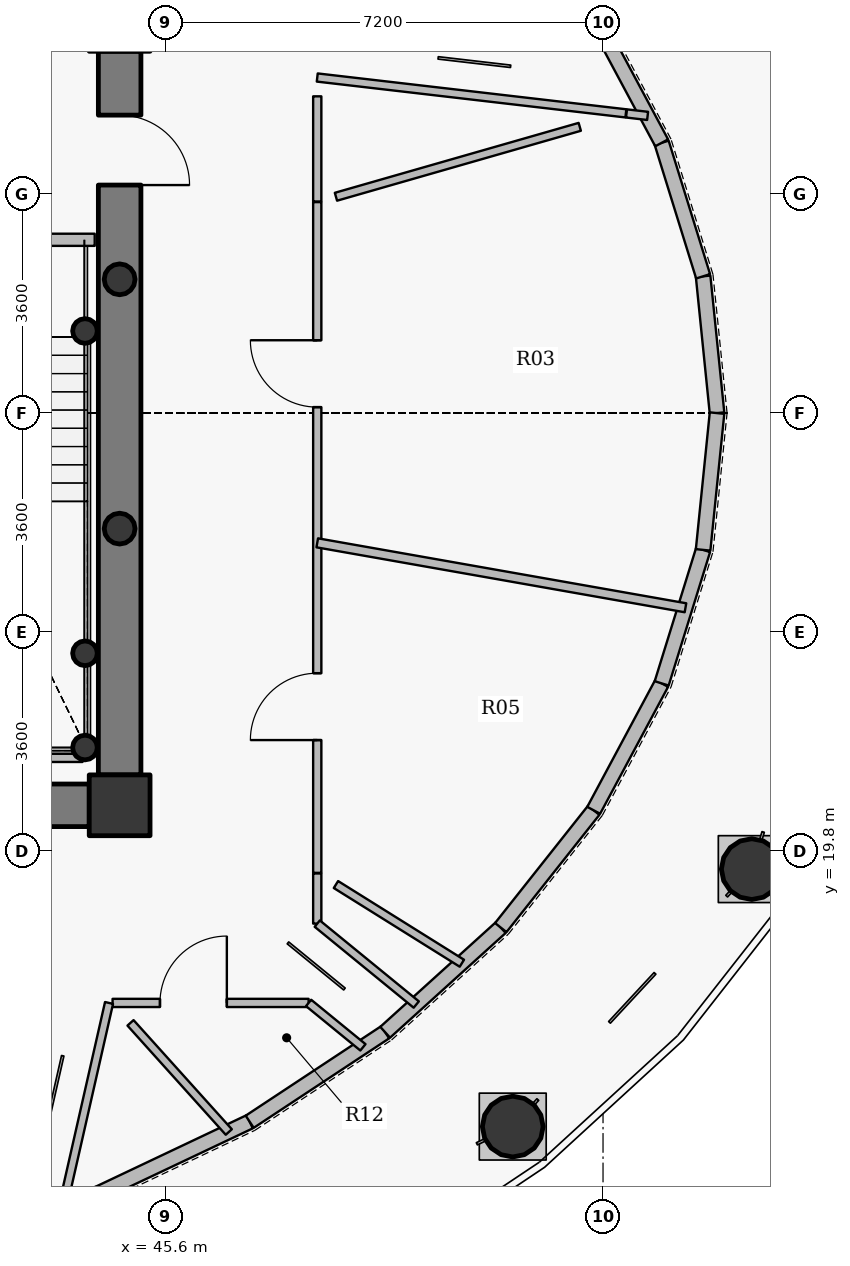
"""IFC4 building model, lengths in metres.
Left out: names, types, materials, properties, quantities, classifications, styles, units other than length and angle.
Written with IfcOpenShell. Run it as: python <this file> out.ifc"""

import sys

from ifc_helpers import new_model, si_unit, direction, frame, frame_2d, origin, origin_2d, place, context, subcontext, project, spatial, rectangle, hollow_circle, extrude, source, transform, mapped, element, fill, save


model = new_model("IFC4")
c1 = context("Model", 3, precision=1e-05, world=origin(), true_north=direction((0.0, 1.0)))
c2 = subcontext(c1, "Body", "Model", "MODEL_VIEW")
j1 = project(units=[si_unit("LENGTHUNIT", "METRE"), si_unit("PLANEANGLEUNIT", "RADIAN")], contexts=[c1])
p1 = place(None, origin())
s1 = spatial("IfcSite", under=j1, at=p1, CompositionType="ELEMENT")
p2 = place(p1, origin())
s2 = spatial("IfcBuilding", under=s1, at=p2, CompositionType="ELEMENT")
p3 = place(p2, frame((0.0, 0.0, 318.0)))
s3 = spatial("IfcBuildingStorey", under=s2, at=p3, CompositionType="ELEMENT", Elevation=318.0)
p4 = place(p3, frame((44.85, 20.55, 0.0), z_axis=(0.0, 0.0, 1.0), x_axis=(1.0, 0.0, 0.0)))
e1 = element("IfcColumn", 1, at=p4, inside=s3, PredefinedType="COLUMN", context=c2, shape_type="SweptSolid", body=[
    extrude(rectangle(XDim=1.0, YDim=1.0, at=origin_2d()), origin(), (0.0, 0.0, 1.0), 6.0),
])
for number, where, z_axis, x_axis in (
    (2, (44.28, 21.5, 0.0), (0.0, 0.0, 1.0), (1.0, 0.0, 0.0)),
    (3, (44.28, 23.05, 0.0), (0.0, 0.0, 1.0), (1.0, 0.0, 0.0)),
    (4, (44.28, 28.35, 0.0), (0.0, 0.0, 1.0), (1.0, 0.0, 0.0)),
):
    element("IfcColumn", number, at=place(p3, frame(where, z_axis=z_axis, x_axis=x_axis)), inside=s3, PredefinedType="COLUMN", context=c2, shape_type="SweptSolid", body=[
        extrude(hollow_circle(Radius=0.203, WallThickness=0.016, at=origin_2d()), origin(), (0.0, 0.0, 1.0), 6.0),
    ])
p5 = place(p3, frame((44.85, 32.95, 0.0), z_axis=(0.0, 0.0, 1.0), x_axis=(0.0, -1.0, 0.0)))
e5 = element("IfcWall", 5, at=p5, inside=s3, PredefinedType="SHEAR", context=c2, shape_type="SweptSolid", body=[
    extrude(rectangle(XDim=11.9, YDim=0.7, at=frame_2d((5.95, 0.0))), origin(), (0.0, 0.0, 1.0), 5.3),
])
p6 = place(p5, frame((1.05, 0.0, 0.0)))
e6 = element("IfcOpeningElement", 6, at=p6, cuts=e5, PredefinedType="OPENING", context=c2, shape_type="SweptSolid", body=[
    extrude(rectangle(XDim=1.15, YDim=2.15, at=origin_2d()), frame((0.575, 0.36, 1.075), z_axis=(0.0, -1.0, 0.0), x_axis=(1.0, 0.0, 0.0)), (0.0, 0.0, 1.0), 0.72),
])
p7 = place(p3, frame((44.35, 20.55, 0.0), z_axis=(0.0, 0.0, 1.0), x_axis=(-1.0, 0.0, 0.0)))
e7 = element("IfcWall", 7, at=p7, inside=s3, PredefinedType="SHEAR", context=c2, shape_type="SweptSolid", body=[
    extrude(rectangle(XDim=16.7, YDim=0.7, at=frame_2d((8.35, 0.0))), origin(), (0.0, 0.0, 1.0), 5.3),
])
p8 = place(p7, frame((12.3, 0.0, 0.0)))
e8 = element("IfcOpeningElement", 8, at=p8, cuts=e7, PredefinedType="OPENING", context=c2, shape_type="SweptSolid", body=[
    extrude(rectangle(XDim=1.15, YDim=2.15, at=origin_2d()), frame((0.575, 0.36, 1.075), z_axis=(0.0, -1.0, 0.0), x_axis=(1.0, 0.0, 0.0)), (0.0, 0.0, 1.0), 0.72),
])
for number, where, z_axis, x_axis in (
    (9, (51.315, 15.267, 0.0), (0.0, 0.0, 1.0), (1.0, 0.0, 0.0)),
    (10, (55.246, 19.5, 0.0), (0.0, 0.0, 1.0), (1.0, 0.0, 0.0)),
):
    element("IfcColumn", number, at=place(p3, frame(where, z_axis=z_axis, x_axis=x_axis)), inside=s3, PredefinedType="COLUMN", context=c2, shape_type="SweptSolid", body=[
        extrude(hollow_circle(Radius=0.5, WallThickness=0.032, at=origin_2d()), origin(), (0.0, 0.0, 1.0), 5.75),
    ])
for number, where, z_axis, x_axis in (
    (11, (44.85, 25.1, 0.0), (0.0, 0.0, 1.0), (1.0, 0.0, 0.0)),
    (12, (44.85, 29.2, 0.0), (0.0, 0.0, 1.0), (1.0, 0.0, 0.0)),
):
    element("IfcColumn", number, at=place(p3, frame(where, z_axis=z_axis, x_axis=x_axis)), inside=s3, PredefinedType="COLUMN", context=c2, shape_type="SweptSolid", body=[
        extrude(hollow_circle(Radius=0.254, WallThickness=0.02, at=origin_2d()), origin(), (0.0, 0.0, 1.0), 6.0),
    ])
p9 = place(p3, frame((54.446, 29.25, 0.0), z_axis=(0.0, 0.0, 1.0), x_axis=(0.101278157468, -0.994858148089, 0.0)))
e13 = element("IfcWall", 13, at=p9, inside=s3, PredefinedType="SOLIDWALL", context=c2, shape_type="SweptSolid", body=[
    extrude(rectangle(XDim=2.261, YDim=0.24, at=frame_2d((1.131, 0.0))), origin(), (0.0, 0.0, 1.0), 4.235),
])
p10 = place(p3, frame((53.765, 31.445, 0.0), z_axis=(0.0, 0.0, 1.0), x_axis=(0.296466035026, -0.95504339696, 0.0)))
e14 = element("IfcWall", 14, at=p10, inside=s3, PredefinedType="SOLIDWALL", context=c2, shape_type="SweptSolid", body=[
    extrude(rectangle(XDim=2.298, YDim=0.24, at=frame_2d((1.149, 0.0))), origin(), (0.0, 0.0, 1.0), 4.235),
])
p11 = place(p3, frame((52.646, 33.532, 0.0), z_axis=(0.0, 0.0, 1.0), x_axis=(0.472149891985, -0.881518280865, 0.0)))
e15 = element("IfcWall", 15, at=p11, inside=s3, PredefinedType="SOLIDWALL", context=c2, shape_type="SweptSolid", body=[
    extrude(rectangle(XDim=2.368, YDim=0.24, at=frame_2d((1.184, 0.0))), origin(), (0.0, 0.0, 1.0), 2.832),
])
p12 = place(p3, frame((46.989, 15.346, 0.0), z_axis=(0.0, 0.0, 1.0), x_axis=(-0.903637179904, -0.428298782505, 0.0)))
e16 = element("IfcWall", 16, at=p12, inside=s3, PredefinedType="SOLIDWALL", context=c2, shape_type="SweptSolid", body=[
    extrude(rectangle(XDim=2.766, YDim=0.24, at=frame_2d((1.383, 0.0))), origin(), (0.0, 0.0, 1.0), 5.75),
])
p13 = place(p3, frame((49.217, 16.818, 0.0), z_axis=(0.0, 0.0, 1.0), x_axis=(-0.834405901953, -0.551150424827, 0.0)))
e17 = element("IfcWall", 17, at=p13, inside=s3, PredefinedType="SOLIDWALL", context=c2, shape_type="SweptSolid", body=[
    extrude(rectangle(XDim=2.67, YDim=0.24, at=frame_2d((1.335, 0.0))), origin(), (0.0, 0.0, 1.0), 2.832),
])
p14 = place(p3, frame((51.118, 18.539, 0.0), z_axis=(0.0, 0.0, 1.0), x_axis=(-0.741265131079, -0.671212340058, 0.0)))
e18 = element("IfcWall", 18, at=p14, inside=s3, PredefinedType="SOLIDWALL", context=c2, shape_type="SweptSolid", body=[
    extrude(rectangle(XDim=2.565, YDim=0.24, at=frame_2d((1.282, 0.0))), origin(), (0.0, 0.0, 1.0), 2.832),
])
p15 = place(p3, frame((52.646, 20.468, 0.0), z_axis=(0.0, 0.0, 1.0), x_axis=(-0.621045987707, -0.783774126361, 0.0)))
e19 = element("IfcWall", 19, at=p15, inside=s3, PredefinedType="SOLIDWALL", context=c2, shape_type="SweptSolid", body=[
    extrude(rectangle(XDim=2.46, YDim=0.24, at=frame_2d((1.23, 0.0))), origin(), (0.0, 0.0, 1.0), 4.235),
])
p16 = place(p3, frame((53.765, 22.555, 0.0), z_axis=(0.0, 0.0, 1.0), x_axis=(-0.472149891985, -0.881518280865, 0.0)))
e20 = element("IfcWall", 20, at=p16, inside=s3, PredefinedType="SOLIDWALL", context=c2, shape_type="SweptSolid", body=[
    extrude(rectangle(XDim=2.368, YDim=0.24, at=frame_2d((1.184, 0.0))), origin(), (0.0, 0.0, 1.0), 4.235),
])
p17 = place(p3, frame((54.446, 24.75, 0.0), z_axis=(0.0, 0.0, 1.0), x_axis=(-0.296466035026, -0.95504339696, 0.0)))
e21 = element("IfcWall", 21, at=p17, inside=s3, PredefinedType="SOLIDWALL", context=c2, shape_type="SweptSolid", body=[
    extrude(rectangle(XDim=2.298, YDim=0.24, at=frame_2d((1.149, 0.0))), origin(), (0.0, 0.0, 1.0), 5.75),
])
p18 = place(p3, frame((54.675, 27.0, 0.0), z_axis=(0.0, 0.0, 1.0), x_axis=(-0.101278157468, -0.994858148089, 0.0)))
e22 = element("IfcWall", 22, at=p18, inside=s3, PredefinedType="SOLIDWALL", context=c2, shape_type="SweptSolid", body=[
    extrude(rectangle(XDim=2.261, YDim=0.24, at=frame_2d((1.131, 0.0))), origin(), (0.0, 0.0, 1.0), 4.235),
])
p19 = place(p3, frame((35.95, 29.85, 0.0), z_axis=(0.0, 0.0, 1.0), x_axis=(1.0, 0.0, 0.0)))
e23 = element("IfcWall", 23, at=p19, inside=s3, PredefinedType="PARTITIONING", context=c2, shape_type="SweptSolid", body=[
    extrude(rectangle(XDim=8.49, YDim=0.2, at=frame_2d((4.245, 0.0))), origin(), (0.0, 0.0, 1.0), 5.335),
])
p20 = place(p19, frame((6.1, 0.0, 0.0)))
e24 = element("IfcOpeningElement", 24, at=p20, cuts=e23, PredefinedType="OPENING", context=c2, shape_type="SweptSolid", body=[
    extrude(rectangle(XDim=1.2, YDim=2.15, at=origin_2d()), frame((0.6, 0.11, 1.075), z_axis=(0.0, -1.0, 0.0), x_axis=(1.0, 0.0, 0.0)), (0.0, 0.0, 1.0), 0.22),
])
p21 = place(p19, frame((0.37, 0.0, 0.0)))
e25 = element("IfcOpeningElement", 25, at=p21, cuts=e23, PredefinedType="OPENING", context=c2, shape_type="SweptSolid", body=[
    extrude(rectangle(XDim=1.15, YDim=2.15, at=origin_2d()), frame((0.575, 0.11, 1.075), z_axis=(0.0, -1.0, 0.0), x_axis=(1.0, 0.0, 0.0)), (0.0, 0.0, 1.0), 0.22),
])
p22 = place(p19, frame((2.425, 0.0, 0.0)))
e26 = element("IfcOpeningElement", 26, at=p22, cuts=e23, PredefinedType="OPENING", context=c2, shape_type="SweptSolid", body=[
    extrude(rectangle(XDim=1.05, YDim=2.15, at=origin_2d()), frame((0.525, 0.11, 1.075), z_axis=(0.0, -1.0, 0.0), x_axis=(1.0, 0.0, 0.0)), (0.0, 0.0, 1.0), 0.22),
])
p23 = place(p3, frame((44.734, 17.3, 0.0), z_axis=(0.0, 0.0, 1.0), x_axis=(1.0, 0.0, 0.0)))
e27 = element("IfcWall", 27, at=p23, inside=s3, PredefinedType="PARTITIONING", context=c2, shape_type="SweptSolid", body=[
    extrude(rectangle(XDim=3.224, YDim=0.135, at=frame_2d((1.612, 0.0))), origin(), (0.0, 0.0, 1.0), 5.75),
])
p24 = place(p23, frame((0.779, 0.0, 0.0)))
e28 = element("IfcOpeningElement", 28, at=p24, cuts=e27, PredefinedType="OPENING", context=c2, shape_type="SweptSolid", body=[
    extrude(rectangle(XDim=1.1, YDim=2.15, at=origin_2d()), frame((0.55, 0.078, 1.075), z_axis=(0.0, -1.0, 0.0), x_axis=(1.0, 0.0, 0.0)), (0.0, 0.0, 1.0), 0.155),
])
p25 = place(p3, frame((47.958, 17.3, 0.0), z_axis=(0.0, 0.0, 1.0), x_axis=(0.774324787676, -0.632788371568, 0.0)))
e29 = element("IfcWall", 29, at=p25, inside=s3, PredefinedType="PARTITIONING", context=c2, shape_type="SweptSolid", body=[
    extrude(rectangle(XDim=1.154, YDim=0.135, at=frame_2d((0.577, 0.0))), origin(), (0.0, 0.0, 1.0), 5.75),
])
p26 = place(p3, frame((48.1, 19.439, 0.0), z_axis=(0.0, 0.0, 1.0), x_axis=(0.0, 1.0, 0.0)))
e30 = element("IfcWall", 30, at=p26, inside=s3, PredefinedType="PARTITIONING", context=c2, shape_type="SweptSolid", body=[
    extrude(rectangle(XDim=11.031, YDim=0.135, at=frame_2d((5.515, 0.0))), origin(), (0.0, 0.0, 1.0), 4.235),
])
p27 = place(p26, frame((2.184, 0.0, 0.0)))
e31 = element("IfcOpeningElement", 31, at=p27, cuts=e30, PredefinedType="OPENING", context=c2, shape_type="SweptSolid", body=[
    extrude(rectangle(XDim=1.1, YDim=2.15, at=origin_2d()), frame((0.55, 0.078, 1.075), z_axis=(0.0, -1.0, 0.0), x_axis=(1.0, 0.0, 0.0)), (0.0, 0.0, 1.0), 0.155),
])
p28 = place(p26, frame((7.659, 0.0, 0.0)))
e32 = element("IfcOpeningElement", 32, at=p28, cuts=e30, PredefinedType="OPENING", context=c2, shape_type="SweptSolid", body=[
    extrude(rectangle(XDim=1.1, YDim=2.15, at=origin_2d()), frame((0.55, 0.078, 1.075), z_axis=(0.0, -1.0, 0.0), x_axis=(1.0, 0.0, 0.0)), (0.0, 0.0, 1.0), 0.155),
])
p29 = place(p3, frame((48.1, 24.866, 0.0), z_axis=(0.0, 0.0, 1.0), x_axis=(0.984805134994, -0.173663024531, 0.0)))
e33 = element("IfcWall", 33, at=p29, inside=s3, PredefinedType="PARTITIONING", context=c2, shape_type="SweptSolid", body=[
    extrude(rectangle(XDim=6.149, YDim=0.15, at=frame_2d((3.075, 0.0))), origin(), (0.0, 0.0, 1.0), 5.75),
])
p30 = place(p3, frame((53.186, 31.928, 0.0), z_axis=(0.0, 0.0, 1.0), x_axis=(0.993273839517, -0.115788944775, 0.0)))
e34 = element("IfcWall", 34, at=p30, inside=s3, PredefinedType="PARTITIONING", context=c2, shape_type="SweptSolid", body=[
    extrude(rectangle(XDim=0.35, YDim=0.135, at=frame_2d((0.175, 0.0))), origin(), (0.0, 0.0, 1.0), 5.75),
])
p31 = place(p3, frame((44.24, 21.33, 0.0), z_axis=(0.0, 0.0, 1.0), x_axis=(-1.0, 0.0, 0.0)))
e35 = element("IfcWall", 35, at=p31, inside=s3, PredefinedType="PARTITIONING", context=c2, shape_type="SweptSolid", body=[
    extrude(rectangle(XDim=2.98, YDim=0.135, at=frame_2d((1.49, 0.0))), origin(), (0.0, 0.0, 1.0), 5.285),
])
p32 = place(p3, frame((44.676, 17.3, 0.0), z_axis=(0.0, 0.0, 1.0), x_axis=(-0.221565425892, -0.975145508142, 0.0)))
e36 = element("IfcWall", 36, at=p32, inside=s3, PredefinedType="PARTITIONING", context=c2, shape_type="SweptSolid", body=[
    extrude(rectangle(XDim=3.411, YDim=0.135, at=frame_2d((1.706, 0.0))), origin(), (0.0, 0.0, 1.0), 5.75),
])
p33 = place(p3, frame((44.36, 20.2, 0.0), z_axis=(0.0, 0.0, 1.0), x_axis=(1.0, 0.0, 0.0)))
e37 = element("IfcWall", 37, at=p33, inside=s3, PredefinedType="PARTITIONING", context=c2, shape_type="SweptSolid", body=[
    extrude(rectangle(XDim=0.84, YDim=0.135, at=frame_2d((0.42, 0.0))), origin(), (0.0, 0.0, 1.0), 2.832),
])
p34 = place(p3, frame((45.2, 20.508, 0.0), z_axis=(0.0, 0.0, 1.0), x_axis=(0.0, 1.0, 0.0)))
e38 = element("IfcWall", 38, at=p34, inside=s3, PredefinedType="PARTITIONING", context=c2, shape_type="SweptSolid", body=[
    extrude(rectangle(XDim=0.532, YDim=0.135, at=frame_2d((0.266, 0.0))), origin(), (0.0, 0.0, 1.0), 5.75),
])
p35 = place(p3, frame((53.176, 31.929, 0.0), z_axis=(0.0, 0.0, 1.0), x_axis=(-0.993315281572, 0.115432886978, 0.0)))
e39 = element("IfcWall", 39, at=p35, inside=s3, PredefinedType="PARTITIONING", context=c2, shape_type="SweptSolid", body=[
    extrude(rectangle(XDim=5.11, YDim=0.135, at=frame_2d((2.555, 0.0))), origin(), (0.0, 0.0, 1.0), 5.75),
])
p36 = place(p3, frame((48.1, 32.209, 0.0), z_axis=(0.0, 0.0, 1.0), x_axis=(0.0, -1.0, 0.0)))
e40 = element("IfcWall", 40, at=p36, inside=s3, PredefinedType="PARTITIONING", context=c2, shape_type="SweptSolid", body=[
    extrude(rectangle(XDim=1.729, YDim=0.135, at=frame_2d((0.865, 0.0))), origin(), (0.0, 0.0, 1.0), 5.75),
])
p37 = place(p3, frame((48.1, 19.429, 0.0), z_axis=(0.0, 0.0, 1.0), x_axis=(0.0, -1.0, 0.0)))
e41 = element("IfcWall", 41, at=p37, inside=s3, PredefinedType="PARTITIONING", context=c2, shape_type="SweptSolid", body=[
    extrude(rectangle(XDim=0.825, YDim=0.135, at=frame_2d((0.413, 0.0))), origin(), (0.0, 0.0, 1.0), 5.75),
])
p38 = place(p3, frame((48.1, 18.604, 0.0), z_axis=(0.0, 0.0, 1.0), x_axis=(0.774324461251, -0.632788771003, 0.0)))
e42 = element("IfcWall", 42, at=p38, inside=s3, PredefinedType="PARTITIONING", context=c2, shape_type="SweptSolid", body=[
    extrude(rectangle(XDim=2.103, YDim=0.135, at=frame_2d((1.051, 0.0))), origin(), (0.0, 0.0, 1.0), 5.335),
])
p39 = place(p3, frame((50.478, 17.953, 0.0), z_axis=(0.0, 0.0, 1.0), x_axis=(-0.848054469379, 0.529909064809, 0.0)))
e43 = element("IfcWall", 43, at=p39, inside=s3, PredefinedType="PARTITIONING", context=c2, shape_type="SweptSolid", body=[
    extrude(rectangle(XDim=2.442, YDim=0.135, at=frame_2d((1.221, 0.0))), origin(), (0.0, 0.0, 1.0), 5.335),
])
p40 = place(p3, frame((48.407, 30.558, 0.0), z_axis=(0.0, 0.0, 1.0), x_axis=(0.961269545764, 0.275609978751, 0.0)))
e44 = element("IfcWall", 44, at=p40, inside=s3, PredefinedType="PARTITIONING", context=c2, shape_type="SweptSolid", body=[
    extrude(rectangle(XDim=4.171, YDim=0.135, at=frame_2d((2.086, 0.0))), origin(), (0.0, 0.0, 1.0), 5.75),
])
p41 = place(p3, frame((46.645, 15.177, 0.0), z_axis=(0.0, 0.0, 1.0), x_axis=(-0.669148972563, 0.743128288062, 0.0)))
e45 = element("IfcWall", 45, at=p41, inside=s3, PredefinedType="PARTITIONING", context=c2, shape_type="SweptSolid", body=[
    extrude(rectangle(XDim=2.416, YDim=0.135, at=frame_2d((1.208, 0.0))), origin(), (0.0, 0.0, 1.0), 5.75),
])
m1 = source(origin(), c2, "Body", "SweptSolid", [
    extrude(rectangle(XDim=1.15, YDim=2.15, at=origin_2d()), frame((0.575, 0.025, 1.075), z_axis=(0.0, -1.0, 0.0), x_axis=(1.0, 0.0, 0.0)), (0.0, 0.0, 1.0), 0.05),
])
p42 = place(p6, origin())
e46 = element("IfcDoor", 46, at=p42, inside=s3, OperationType="SINGLE_SWING_RIGHT", PredefinedType="DOOR", context=c2, shape_type="MappedRepresentation", body=[
    mapped(m1, transform((0.0, 0.0, 0.0), x_axis=(1.0, 0.0, 0.0), y_axis=(0.0, 1.0, 0.0), z_axis=(0.0, 0.0, 1.0), scale=1.0)),
])
fill(e6, e46)
m2 = source(origin(), c2, "Body", "SweptSolid", [
    extrude(rectangle(XDim=1.1, YDim=2.15, at=origin_2d()), frame((0.55, 0.025, 1.075), z_axis=(0.0, -1.0, 0.0), x_axis=(1.0, 0.0, 0.0)), (0.0, 0.0, 1.0), 0.05),
])
p43 = place(p27, origin())
e47 = element("IfcDoor", 47, at=p43, inside=s3, OperationType="SINGLE_SWING_LEFT", PredefinedType="DOOR", context=c2, shape_type="MappedRepresentation", body=[
    mapped(m2, transform((0.0, 0.0, 0.0), x_axis=(1.0, 0.0, 0.0), y_axis=(0.0, 1.0, 0.0), z_axis=(0.0, 0.0, 1.0), scale=1.0)),
])
fill(e31, e47)
p44 = place(p28, origin())
e48 = element("IfcDoor", 48, at=p44, inside=s3, OperationType="SINGLE_SWING_RIGHT", PredefinedType="DOOR", context=c2, shape_type="MappedRepresentation", body=[
    mapped(m2, transform((0.0, 0.0, 0.0), x_axis=(1.0, 0.0, 0.0), y_axis=(0.0, 1.0, 0.0), z_axis=(0.0, 0.0, 1.0), scale=1.0)),
])
fill(e32, e48)
p45 = place(p24, origin())
e49 = element("IfcDoor", 49, at=p45, inside=s3, OperationType="SINGLE_SWING_RIGHT", PredefinedType="DOOR", context=c2, shape_type="MappedRepresentation", body=[
    mapped(m2, transform((0.0, 0.0, 0.0), x_axis=(1.0, 0.0, 0.0), y_axis=(0.0, 1.0, 0.0), z_axis=(0.0, 0.0, 1.0), scale=1.0)),
])
fill(e28, e49)
save(model, sys.argv[1])
